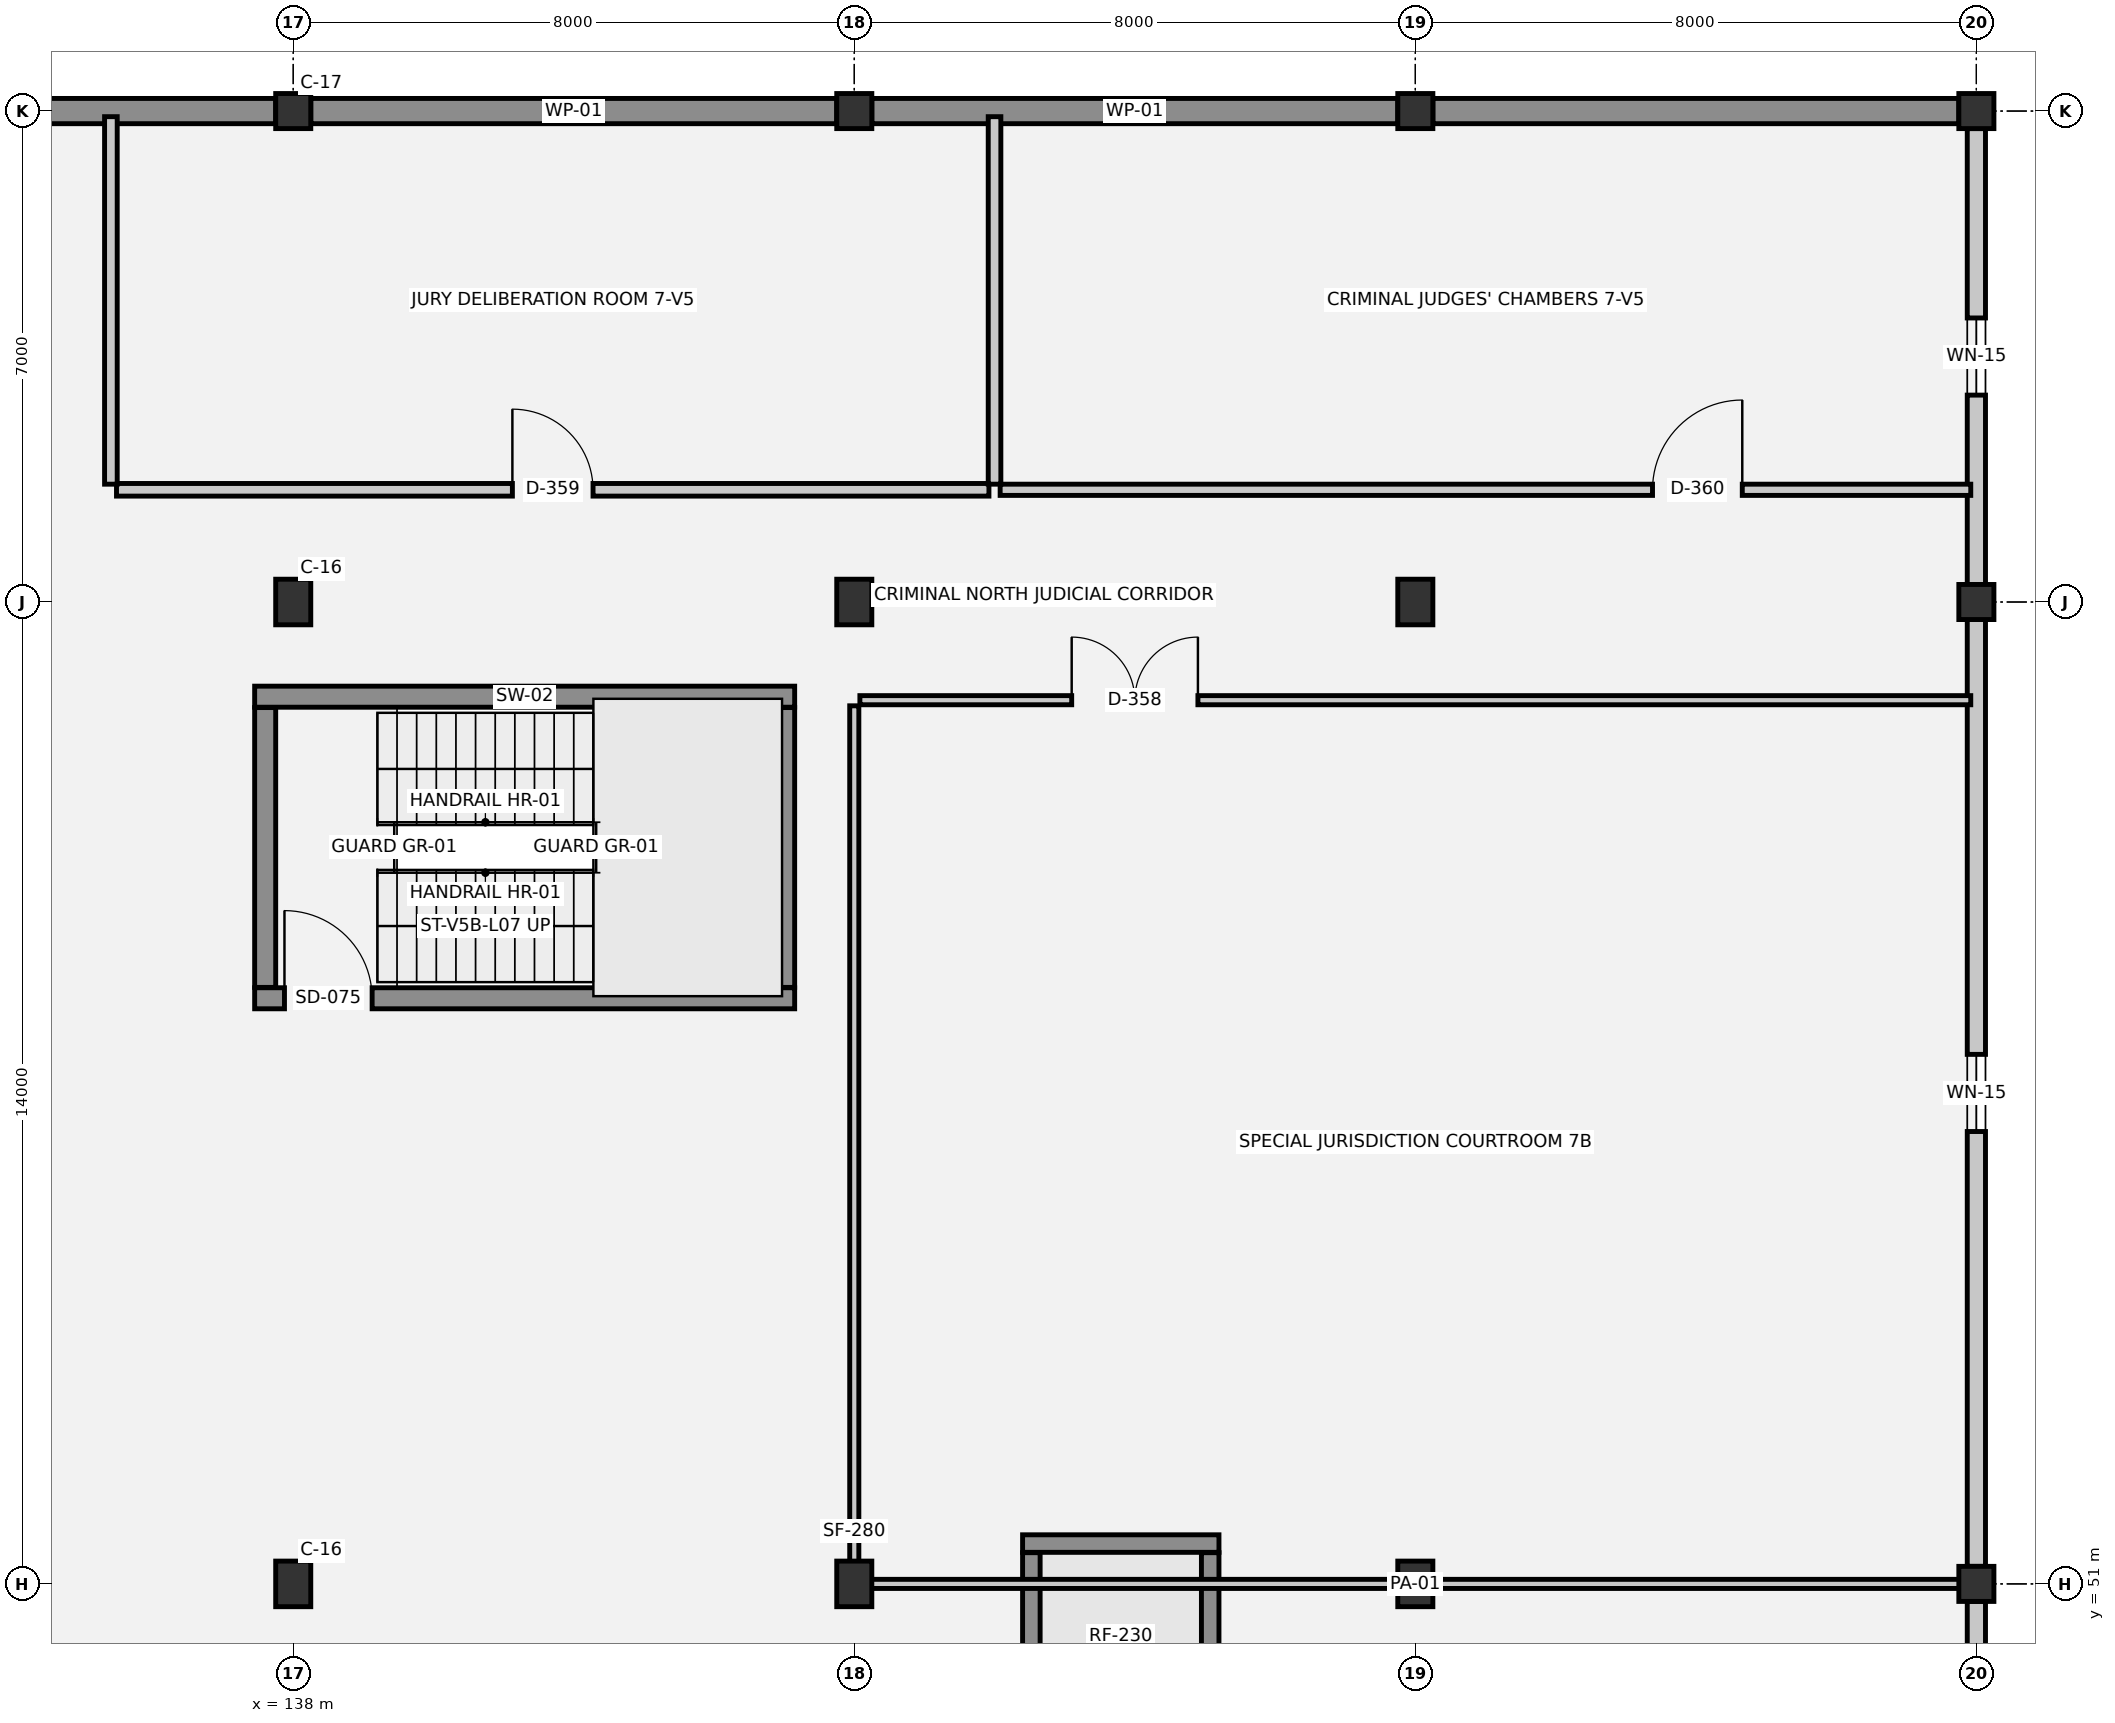
"""IFC4 building model, lengths in metres.
Left out: names, types, materials, properties, quantities, classifications, styles, units other than length and angle.
Written with IfcOpenShell. Run it as: python <this file> out.ifc"""

import sys

from ifc_helpers import new_model, si_unit, direction, frame, frame_2d, origin, origin_2d, place, context, subcontext, project, spatial, rectangle, extrude, element, fill, save


model = new_model("IFC4")
c1 = context("Model", 3, precision=1e-05, world=origin(), true_north=direction((0.0, 1.0)))
c2 = subcontext(c1, "Body", "Model", "MODEL_VIEW")
j1 = project(units=[si_unit("LENGTHUNIT", "METRE"), si_unit("PLANEANGLEUNIT", "RADIAN")], contexts=[c1])
p1 = place(None, origin())
s1 = spatial("IfcSite", under=j1, at=p1, CompositionType="ELEMENT")
p2 = place(p1, origin())
s2 = spatial("IfcBuilding", under=s1, at=p2, CompositionType="ELEMENT")
p3 = place(p2, frame((0.0, 0.0, 25.8)))
s3 = spatial("IfcBuildingStorey", under=s2, at=p3, CompositionType="ELEMENT", Elevation=25.8)
for number, where, z_axis, x_axis in (
    (1, (138.0, 51.0, 0.0), (0.0, 0.0, 1.0), (1.0, 0.0, 0.0)),
    (2, (138.0, 65.0, 0.0), (0.0, 0.0, 1.0), (1.0, 0.0, 0.0)),
):
    element("IfcColumn", number, at=place(p3, frame(where, z_axis=z_axis, x_axis=x_axis)), inside=s3, PredefinedType="COLUMN", context=c2, shape_type="SweptSolid", body=[
        extrude(rectangle(XDim=0.5, YDim=0.65, at=origin_2d()), origin(), (0.0, 0.0, 1.0), 3.75),
    ])
p4 = place(p3, frame((138.0, 72.0, 0.0), z_axis=(0.0, 0.0, 1.0), x_axis=(1.0, 0.0, 0.0)))
e3 = element("IfcColumn", 3, at=p4, inside=s3, PredefinedType="COLUMN", context=c2, shape_type="SweptSolid", body=[
    extrude(rectangle(XDim=0.5, YDim=0.5, at=origin_2d()), origin(), (0.0, 0.0, 1.0), 3.75),
])
for number, where, z_axis, x_axis in (
    (4, (146.0, 51.0, 0.0), (0.0, 0.0, 1.0), (1.0, 0.0, 0.0)),
    (5, (146.0, 65.0, 0.0), (0.0, 0.0, 1.0), (1.0, 0.0, 0.0)),
):
    element("IfcColumn", number, at=place(p3, frame(where, z_axis=z_axis, x_axis=x_axis)), inside=s3, PredefinedType="COLUMN", context=c2, shape_type="SweptSolid", body=[
        extrude(rectangle(XDim=0.5, YDim=0.65, at=origin_2d()), origin(), (0.0, 0.0, 1.0), 3.75),
    ])
p5 = place(p3, frame((146.0, 72.0, 0.0), z_axis=(0.0, 0.0, 1.0), x_axis=(1.0, 0.0, 0.0)))
e6 = element("IfcColumn", 6, at=p5, inside=s3, PredefinedType="COLUMN", context=c2, shape_type="SweptSolid", body=[
    extrude(rectangle(XDim=0.5, YDim=0.5, at=origin_2d()), origin(), (0.0, 0.0, 1.0), 3.75),
])
for number, where, z_axis, x_axis in (
    (7, (154.0, 51.0, 0.0), (0.0, 0.0, 1.0), (1.0, 0.0, 0.0)),
    (8, (154.0, 65.0, 0.0), (0.0, 0.0, 1.0), (1.0, 0.0, 0.0)),
):
    element("IfcColumn", number, at=place(p3, frame(where, z_axis=z_axis, x_axis=x_axis)), inside=s3, PredefinedType="COLUMN", context=c2, shape_type="SweptSolid", body=[
        extrude(rectangle(XDim=0.5, YDim=0.65, at=origin_2d()), origin(), (0.0, 0.0, 1.0), 3.75),
    ])
for number, where, z_axis, x_axis in (
    (9, (154.0, 72.0, 0.0), (0.0, 0.0, 1.0), (1.0, 0.0, 0.0)),
    (10, (162.0, 51.0, 0.0), (0.0, 0.0, 1.0), (1.0, 0.0, 0.0)),
    (11, (162.0, 65.0, 0.0), (0.0, 0.0, 1.0), (1.0, 0.0, 0.0)),
    (12, (162.0, 72.0, 0.0), (0.0, 0.0, 1.0), (1.0, 0.0, 0.0)),
):
    element("IfcColumn", number, at=place(p3, frame(where, z_axis=z_axis, x_axis=x_axis)), inside=s3, PredefinedType="COLUMN", context=c2, shape_type="SweptSolid", body=[
        extrude(rectangle(XDim=0.5, YDim=0.5, at=origin_2d()), origin(), (0.0, 0.0, 1.0), 3.75),
    ])
for number, where, z_axis, x_axis in (
    (13, (130.25, 72.0, 0.0), (0.0, 0.0, 1.0), (1.0, 0.0, 0.0)),
    (14, (138.25, 72.0, 0.0), (0.0, 0.0, 1.0), (1.0, 0.0, 0.0)),
    (15, (146.25, 72.0, 0.0), (0.0, 0.0, 1.0), (1.0, 0.0, 0.0)),
    (16, (154.25, 72.0, 0.0), (0.0, 0.0, 1.0), (1.0, 0.0, 0.0)),
):
    element("IfcWall", number, at=place(p3, frame(where, z_axis=z_axis, x_axis=x_axis)), inside=s3, PredefinedType="SOLIDWALL", context=c2, shape_type="SweptSolid", body=[
        extrude(rectangle(XDim=7.5, YDim=0.36, at=frame_2d((3.75, 0.0))), origin(), (0.0, 0.0, 1.0), 3.47),
    ])
p6 = place(p3, frame((162.0, 71.75, 0.0), z_axis=(0.0, 0.0, 1.0), x_axis=(0.0, -1.0, 0.0)))
e17 = element("IfcWall", 17, at=p6, inside=s3, PredefinedType="SOLIDWALL", context=c2, shape_type="SweptSolid", body=[
    extrude(rectangle(XDim=6.5, YDim=0.26, at=frame_2d((3.25, 0.0))), origin(), (0.0, 0.0, 1.0), 2.55),
])
p7 = place(p6, frame((2.7, 0.0, 1.0)))
e18 = element("IfcOpeningElement", 18, at=p7, cuts=e17, PredefinedType="OPENING", context=c2, shape_type="SweptSolid", body=[
    extrude(rectangle(XDim=1.1, YDim=1.2, at=frame_2d((0.55, 0.6))), frame((0.0, 0.14, 0.0), z_axis=(0.0, -1.0, 0.0), x_axis=(1.0, 0.0, 0.0)), (0.0, 0.0, 1.0), 0.28),
])
p8 = place(p3, frame((162.0, 64.75, 0.0), z_axis=(0.0, 0.0, 1.0), x_axis=(0.0, -1.0, 0.0)))
e19 = element("IfcWall", 19, at=p8, inside=s3, PredefinedType="SOLIDWALL", context=c2, shape_type="SweptSolid", body=[
    extrude(rectangle(XDim=13.5, YDim=0.26, at=frame_2d((6.75, 0.0))), origin(), (0.0, 0.0, 1.0), 2.55),
])
p9 = place(p8, frame((6.2, 0.0, 1.0)))
e20 = element("IfcOpeningElement", 20, at=p9, cuts=e19, PredefinedType="OPENING", context=c2, shape_type="SweptSolid", body=[
    extrude(rectangle(XDim=1.1, YDim=1.2, at=frame_2d((0.55, 0.6))), frame((0.0, 0.14, 0.0), z_axis=(0.0, -1.0, 0.0), x_axis=(1.0, 0.0, 0.0)), (0.0, 0.0, 1.0), 0.28),
])
p10 = place(p3, frame((162.0, 50.75, 0.0), z_axis=(0.0, 0.0, 1.0), x_axis=(0.0, -1.0, 0.0)))
e21 = element("IfcWall", 21, at=p10, inside=s3, PredefinedType="SOLIDWALL", context=c2, shape_type="SweptSolid", body=[
    extrude(rectangle(XDim=6.5, YDim=0.26, at=frame_2d((3.25, 0.0))), origin(), (0.0, 0.0, 1.0), 2.55),
])
p11 = place(p10, frame((2.7, 0.0, 1.0)))
e22 = element("IfcOpeningElement", 22, at=p11, cuts=e21, PredefinedType="OPENING", context=c2, shape_type="SweptSolid", body=[
    extrude(rectangle(XDim=1.1, YDim=1.2, at=frame_2d((0.55, 0.6))), frame((0.0, 0.14, 0.0), z_axis=(0.0, -1.0, 0.0), x_axis=(1.0, 0.0, 0.0)), (0.0, 0.0, 1.0), 0.28),
])
p12 = place(p3, frame((151.2, 51.575, -0.28), z_axis=(0.0, 0.0, 1.0), x_axis=(-1.0, 0.0, 0.0)))
e23 = element("IfcWall", 23, at=p12, inside=s3, PredefinedType="SHEAR", context=c2, shape_type="SweptSolid", body=[
    extrude(rectangle(XDim=2.8, YDim=0.25, at=frame_2d((1.4, 0.0))), origin(), (0.0, 0.0, 1.0), 1.08),
])
for number, where, z_axis, x_axis in (
    (24, (148.525, 51.445, -0.28), (0.0, 0.0, 1.0), (0.0, -1.0, 0.0)),
    (25, (151.075, 49.055, -0.28), (0.0, 0.0, 1.0), (0.0, 1.0, 0.0)),
):
    element("IfcWall", number, at=place(p3, frame(where, z_axis=z_axis, x_axis=x_axis)), inside=s3, PredefinedType="SHEAR", context=c2, shape_type="SweptSolid", body=[
        extrude(rectangle(XDim=2.39, YDim=0.25, at=frame_2d((1.195, 0.0))), origin(), (0.0, 0.0, 1.0), 1.08),
    ])
p13 = place(p3, frame((145.15, 63.65, 0.0), z_axis=(0.0, 0.0, 1.0), x_axis=(-1.0, 0.0, 0.0)))
e26 = element("IfcWall", 26, at=p13, inside=s3, PredefinedType="SHEAR", context=c2, shape_type="SweptSolid", body=[
    extrude(rectangle(XDim=7.7, YDim=0.3, at=frame_2d((3.85, 0.0))), origin(), (0.0, 0.0, 1.0), 3.47),
])
p14 = place(p3, frame((137.45, 59.35, 0.0), z_axis=(0.0, 0.0, 1.0), x_axis=(1.0, 0.0, 0.0)))
e27 = element("IfcWall", 27, at=p14, inside=s3, PredefinedType="SHEAR", context=c2, shape_type="SweptSolid", body=[
    extrude(rectangle(XDim=7.7, YDim=0.3, at=frame_2d((3.85, 0.0))), origin(), (0.0, 0.0, 1.0), 3.47),
])
p15 = place(p14, frame((0.425, 0.0, 0.0)))
e28 = element("IfcOpeningElement", 28, at=p15, cuts=e27, PredefinedType="OPENING", context=c2, shape_type="SweptSolid", body=[
    extrude(rectangle(XDim=1.25, YDim=2.15, at=frame_2d((0.625, 1.075))), frame((0.0, 0.16, 0.0), z_axis=(0.0, -1.0, 0.0), x_axis=(1.0, 0.0, 0.0)), (0.0, 0.0, 1.0), 0.32),
])
for number, where, z_axis, x_axis in (
    (29, (137.6, 63.495, 0.0), (0.0, 0.0, 1.0), (0.0, -1.0, 0.0)),
    (30, (145.0, 59.505, 0.0), (0.0, 0.0, 1.0), (0.0, 1.0, 0.0)),
):
    element("IfcWall", number, at=place(p3, frame(where, z_axis=z_axis, x_axis=x_axis)), inside=s3, PredefinedType="SHEAR", context=c2, shape_type="SweptSolid", body=[
        extrude(rectangle(XDim=3.99, YDim=0.3, at=frame_2d((1.995, 0.0))), origin(), (0.0, 0.0, 1.0), 3.47),
    ])
p16 = place(p3, frame((146.08, 51.0, 0.0), z_axis=(0.0, 0.0, 1.0), x_axis=(1.0, 0.0, 0.0)))
e31 = element("IfcWall", 31, at=p16, inside=s3, PredefinedType="PARTITIONING", context=c2, shape_type="SweptSolid", body=[
    extrude(rectangle(XDim=15.84, YDim=0.13, at=frame_2d((7.92, 0.0))), origin(), (0.0, 0.0, 1.0), 2.82),
])
p17 = place(p3, frame((146.08, 63.6, 0.0), z_axis=(0.0, 0.0, 1.0), x_axis=(1.0, 0.0, 0.0)))
e32 = element("IfcWall", 32, at=p17, inside=s3, PredefinedType="PARTITIONING", context=c2, shape_type="SweptSolid", body=[
    extrude(rectangle(XDim=15.84, YDim=0.13, at=frame_2d((7.92, 0.0))), origin(), (0.0, 0.0, 1.0), 3.39),
])
p18 = place(p17, frame((3.02, 0.0, 0.0)))
e33 = element("IfcOpeningElement", 33, at=p18, cuts=e32, PredefinedType="OPENING", context=c2, shape_type="SweptSolid", body=[
    extrude(rectangle(XDim=1.8, YDim=2.3, at=frame_2d((0.9, 1.15))), frame((0.0, 0.075, 0.0), z_axis=(0.0, -1.0, 0.0), x_axis=(1.0, 0.0, 0.0)), (0.0, 0.0, 1.0), 0.15),
])
p19 = place(p3, frame((135.48, 66.6, 0.0), z_axis=(0.0, 0.0, 1.0), x_axis=(1.0, 0.0, 0.0)))
e34 = element("IfcWall", 34, at=p19, inside=s3, PredefinedType="PARTITIONING", context=c2, shape_type="SweptSolid", body=[
    extrude(rectangle(XDim=12.44, YDim=0.18, at=frame_2d((6.22, 0.0))), origin(), (0.0, 0.0, 1.0), 3.39),
])
p20 = place(p19, frame((5.645, 0.0, 0.0)))
e35 = element("IfcOpeningElement", 35, at=p20, cuts=e34, PredefinedType="OPENING", context=c2, shape_type="SweptSolid", body=[
    extrude(rectangle(XDim=1.15, YDim=2.2, at=frame_2d((0.575, 1.1))), frame((0.0, 0.1, 0.0), z_axis=(0.0, -1.0, 0.0), x_axis=(1.0, 0.0, 0.0)), (0.0, 0.0, 1.0), 0.2),
])
p21 = place(p3, frame((148.08, 66.6, 0.0), z_axis=(0.0, 0.0, 1.0), x_axis=(1.0, 0.0, 0.0)))
e36 = element("IfcWall", 36, at=p21, inside=s3, PredefinedType="PARTITIONING", context=c2, shape_type="SweptSolid", body=[
    extrude(rectangle(XDim=13.84, YDim=0.16, at=frame_2d((6.92, 0.0))), origin(), (0.0, 0.0, 1.0), 3.39),
])
p22 = place(p21, frame((9.302, 0.0, 0.0)))
e37 = element("IfcOpeningElement", 37, at=p22, cuts=e36, PredefinedType="OPENING", context=c2, shape_type="SweptSolid", body=[
    extrude(rectangle(XDim=1.28, YDim=2.2, at=frame_2d((0.64, 1.1))), frame((0.0, 0.09, 0.0), z_axis=(0.0, -1.0, 0.0), x_axis=(1.0, 0.0, 0.0)), (0.0, 0.0, 1.0), 0.18),
])
p23 = place(p3, frame((135.4, 66.68, 0.0), z_axis=(0.0, 0.0, 1.0), x_axis=(0.0, 1.0, 0.0)))
e38 = element("IfcWall", 38, at=p23, inside=s3, PredefinedType="PARTITIONING", context=c2, shape_type="SweptSolid", body=[
    extrude(rectangle(XDim=5.24, YDim=0.18, at=frame_2d((2.62, 0.0))), origin(), (0.0, 0.0, 1.0), 3.39),
])
p24 = place(p3, frame((146.0, 51.08, 0.0), z_axis=(0.0, 0.0, 1.0), x_axis=(0.0, 1.0, 0.0)))
e39 = element("IfcWall", 39, at=p24, inside=s3, PredefinedType="PARTITIONING", context=c2, shape_type="SweptSolid", body=[
    extrude(rectangle(XDim=12.44, YDim=0.13, at=frame_2d((6.22, 0.0))), origin(), (0.0, 0.0, 1.0), 2.62),
])
p25 = place(p3, frame((148.0, 66.68, 0.0), z_axis=(0.0, 0.0, 1.0), x_axis=(0.0, 1.0, 0.0)))
e40 = element("IfcWall", 40, at=p25, inside=s3, PredefinedType="PARTITIONING", context=c2, shape_type="SweptSolid", body=[
    extrude(rectangle(XDim=5.24, YDim=0.18, at=frame_2d((2.62, 0.0))), origin(), (0.0, 0.0, 1.0), 3.39),
])
p26 = place(p7, origin())
e41 = element("IfcWindow", 41, at=p26, inside=s3, PartitioningType="SINGLE_PANEL", PredefinedType="WINDOW", context=c2, shape_type="SweptSolid", body=[
    extrude(rectangle(XDim=1.1, YDim=1.2, at=frame_2d((0.55, 0.6))), frame((0.0, 0.03, 0.0), z_axis=(0.0, -1.0, 0.0), x_axis=(1.0, 0.0, 0.0)), (0.0, 0.0, 1.0), 0.06),
])
fill(e18, e41)
p27 = place(p9, origin())
e42 = element("IfcWindow", 42, at=p27, inside=s3, PartitioningType="SINGLE_PANEL", PredefinedType="WINDOW", context=c2, shape_type="SweptSolid", body=[
    extrude(rectangle(XDim=1.1, YDim=1.2, at=frame_2d((0.55, 0.6))), frame((0.0, 0.03, 0.0), z_axis=(0.0, -1.0, 0.0), x_axis=(1.0, 0.0, 0.0)), (0.0, 0.0, 1.0), 0.06),
])
fill(e20, e42)
p28 = place(p15, origin())
e43 = element("IfcDoor", 43, at=p28, inside=s3, OperationType="SINGLE_SWING_LEFT", PredefinedType="DOOR", context=c2, shape_type="SweptSolid", body=[
    extrude(rectangle(XDim=1.25, YDim=2.15, at=frame_2d((0.625, 1.075))), frame((0.0, 0.025, 0.0), z_axis=(0.0, -1.0, 0.0), x_axis=(1.0, 0.0, 0.0)), (0.0, 0.0, 1.0), 0.05),
])
fill(e28, e43)
p29 = place(p18, origin())
e44 = element("IfcDoor", 44, at=p29, inside=s3, OperationType="DOUBLE_DOOR_SINGLE_SWING", PredefinedType="DOOR", context=c2, shape_type="SweptSolid", body=[
    extrude(rectangle(XDim=1.8, YDim=2.3, at=frame_2d((0.9, 1.15))), frame((0.0, 0.025, 0.0), z_axis=(0.0, -1.0, 0.0), x_axis=(1.0, 0.0, 0.0)), (0.0, 0.0, 1.0), 0.05),
])
fill(e33, e44)
p30 = place(p20, origin())
e45 = element("IfcDoor", 45, at=p30, inside=s3, OperationType="SINGLE_SWING_LEFT", PredefinedType="DOOR", context=c2, shape_type="SweptSolid", body=[
    extrude(rectangle(XDim=1.15, YDim=2.2, at=frame_2d((0.575, 1.1))), frame((0.0, 0.025, 0.0), z_axis=(0.0, -1.0, 0.0), x_axis=(1.0, 0.0, 0.0)), (0.0, 0.0, 1.0), 0.05),
])
fill(e35, e45)
p31 = place(p22, origin())
e46 = element("IfcDoor", 46, at=p31, inside=s3, OperationType="SINGLE_SWING_RIGHT", PredefinedType="DOOR", context=c2, shape_type="SweptSolid", body=[
    extrude(rectangle(XDim=1.28, YDim=2.2, at=frame_2d((0.64, 1.1))), frame((0.0, 0.025, 0.0), z_axis=(0.0, -1.0, 0.0), x_axis=(1.0, 0.0, 0.0)), (0.0, 0.0, 1.0), 0.05),
])
fill(e37, e46)
save(model, sys.argv[1])
